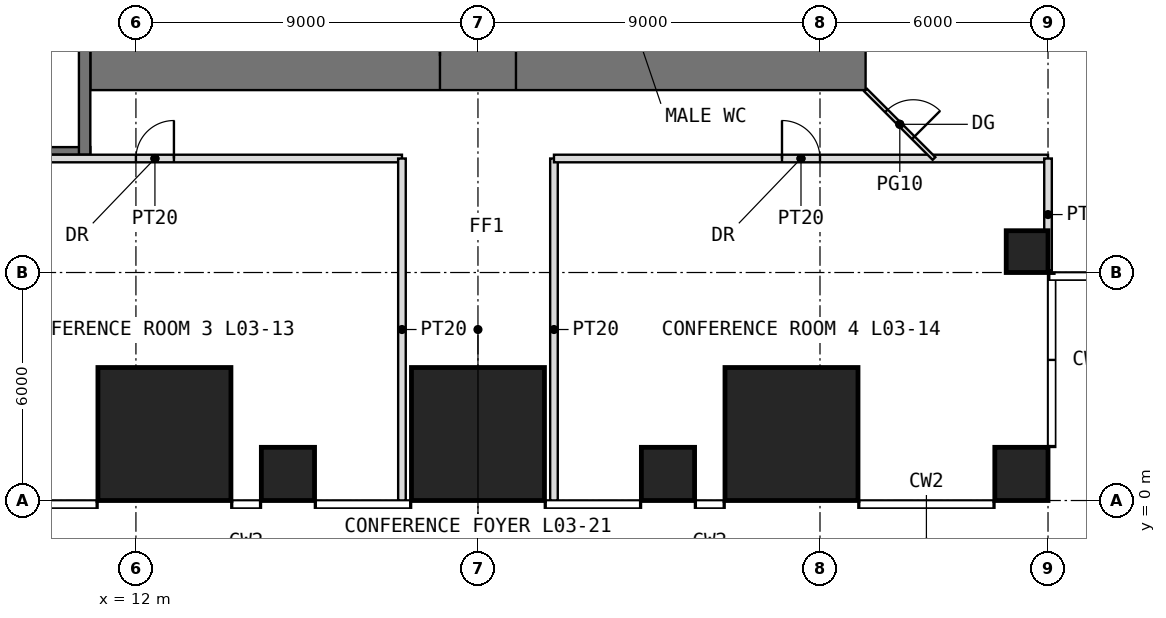
"""IFC4 building model, lengths in metres.
Left out: names, types, materials, properties, quantities, classifications, styles, units other than length and angle.
Written with IfcOpenShell. Run it as: python <this file> out.ifc"""

import sys

from ifc_helpers import new_model, si_unit, direction, frame, frame_2d, origin, origin_2d, place, context, subcontext, project, spatial, rectangle, extrude, element, fill, save


model = new_model("IFC4")
c1 = context("Model", 3, precision=1e-05, world=origin(), true_north=direction((0.0, 1.0)))
c2 = subcontext(c1, "Body", "Model", "MODEL_VIEW")
j1 = project(units=[si_unit("LENGTHUNIT", "METRE"), si_unit("PLANEANGLEUNIT", "RADIAN")], contexts=[c1])
p1 = place(None, origin())
s1 = spatial("IfcSite", under=j1, at=p1, CompositionType="ELEMENT")
p2 = place(p1, origin())
s2 = spatial("IfcBuilding", under=s1, at=p2, CompositionType="ELEMENT")
p3 = place(p2, frame((0.0, 0.0, 18.0)))
s3 = spatial("IfcBuildingStorey", under=s2, at=p3, CompositionType="ELEMENT", Elevation=18.0)
p4 = place(p3, frame((12.75, 1.75, 0.0), z_axis=(0.0, 0.0, 1.0), x_axis=(1.0, 0.0, 0.0)))
e1 = element("IfcColumn", 1, at=p4, inside=s3, PredefinedType="COLUMN", context=c2, shape_type="SweptSolid", body=[
    extrude(rectangle(XDim=3.5, YDim=3.5, at=origin_2d()), origin(), (0.0, 0.0, 1.0), 4.5),
])
p5 = place(p3, frame((16.0, 0.7, 0.0), z_axis=(0.0, 0.0, 1.0), x_axis=(1.0, 0.0, 0.0)))
e2 = element("IfcColumn", 2, at=p5, inside=s3, PredefinedType="COLUMN", context=c2, shape_type="SweptSolid", body=[
    extrude(rectangle(XDim=1.4, YDim=1.4, at=origin_2d()), origin(), (0.0, 0.0, 1.0), 4.5),
])
p6 = place(p3, frame((21.0, 1.75, 0.0), z_axis=(0.0, 0.0, 1.0), x_axis=(1.0, 0.0, 0.0)))
e3 = element("IfcColumn", 3, at=p6, inside=s3, PredefinedType="COLUMN", context=c2, shape_type="SweptSolid", body=[
    extrude(rectangle(XDim=3.5, YDim=3.5, at=origin_2d()), origin(), (0.0, 0.0, 1.0), 4.5),
])
p7 = place(p3, frame((26.0, 0.7, 0.0), z_axis=(0.0, 0.0, 1.0), x_axis=(1.0, 0.0, 0.0)))
e4 = element("IfcColumn", 4, at=p7, inside=s3, PredefinedType="COLUMN", context=c2, shape_type="SweptSolid", body=[
    extrude(rectangle(XDim=1.4, YDim=1.4, at=origin_2d()), origin(), (0.0, 0.0, 1.0), 4.5),
])
p8 = place(p3, frame((29.25, 1.75, 0.0), z_axis=(0.0, 0.0, 1.0), x_axis=(1.0, 0.0, 0.0)))
e5 = element("IfcColumn", 5, at=p8, inside=s3, PredefinedType="COLUMN", context=c2, shape_type="SweptSolid", body=[
    extrude(rectangle(XDim=3.5, YDim=3.5, at=origin_2d()), origin(), (0.0, 0.0, 1.0), 4.5),
])
p9 = place(p3, frame((35.3, 0.7, 0.0), z_axis=(0.0, 0.0, 1.0), x_axis=(1.0, 0.0, 0.0)))
e6 = element("IfcColumn", 6, at=p9, inside=s3, PredefinedType="COLUMN", context=c2, shape_type="SweptSolid", body=[
    extrude(rectangle(XDim=1.4, YDim=1.4, at=origin_2d()), origin(), (0.0, 0.0, 1.0), 4.5),
])
p10 = place(p3, frame((35.45, 6.55, 0.0), z_axis=(0.0, 0.0, 1.0), x_axis=(1.0, 0.0, 0.0)))
e7 = element("IfcColumn", 7, at=p10, inside=s3, PredefinedType="COLUMN", context=c2, shape_type="SweptSolid", body=[
    extrude(rectangle(XDim=1.1, YDim=1.1, at=origin_2d()), origin(), (0.0, 0.0, 1.0), 4.5),
])
p11 = place(p3, frame((10.8, 11.7, -0.2), z_axis=(0.0, 0.0, 1.0), x_axis=(1.0, 0.0, 0.0)))
e8 = element("IfcWall", 8, at=p11, inside=s3, PredefinedType="SHEAR", context=c2, shape_type="SweptSolid", body=[
    extrude(rectangle(XDim=20.4, YDim=1.8, at=frame_2d((10.2, 0.0))), origin(), (0.0, 0.0, 1.0), 4.65),
])
p12 = place(p11, frame((9.2, 0.0, 0.2)))
e9 = element("IfcOpeningElement", 9, at=p12, cuts=e8, PredefinedType="OPENING", context=c2, shape_type="SweptSolid", body=[
    extrude(rectangle(XDim=2.0, YDim=2.2, at=frame_2d((1.0, 1.1))), frame((0.0, 0.91, 0.0), z_axis=(0.0, -1.0, 0.0), x_axis=(1.0, 0.0, 0.0)), (0.0, 0.0, 1.0), 1.82),
])
p13 = place(p3, frame((3.8, 9.2, -0.2), z_axis=(0.0, 0.0, 1.0), x_axis=(1.0, 0.0, 0.0)))
e10 = element("IfcWall", 10, at=p13, inside=s3, PredefinedType="SOLIDWALL", context=c2, shape_type="SweptSolid", body=[
    extrude(rectangle(XDim=7.0, YDim=0.2, at=frame_2d((3.5, 0.0))), origin(), (0.0, 0.0, 1.0), 4.65),
])
p14 = place(p3, frame((10.65, 9.1, -0.2), z_axis=(0.0, 0.0, 1.0), x_axis=(0.0, 1.0, 0.0)))
e11 = element("IfcWall", 11, at=p14, inside=s3, PredefinedType="SOLIDWALL", context=c2, shape_type="SweptSolid", body=[
    extrude(rectangle(XDim=12.4, YDim=0.3, at=frame_2d((6.2, 0.0))), origin(), (0.0, 0.0, 1.0), 4.65),
])
p15 = place(p3, frame((6.0, 9.0, 0.0), z_axis=(0.0, 0.0, 1.0), x_axis=(1.0, 0.0, 0.0)))
e12 = element("IfcWall", 12, at=p15, inside=s3, PredefinedType="PARTITIONING", context=c2, shape_type="SweptSolid", body=[
    extrude(rectangle(XDim=13.0, YDim=0.2, at=frame_2d((6.5, 0.0))), origin(), (0.0, 0.0, 1.0), 4.25),
])
p16 = place(p15, frame((6.0, 0.0, 0.0)))
e13 = element("IfcOpeningElement", 13, at=p16, cuts=e12, PredefinedType="OPENING", context=c2, shape_type="SweptSolid", body=[
    extrude(rectangle(XDim=1.0, YDim=2.2, at=frame_2d((0.5, 1.1))), frame((0.0, 0.11, 0.0), z_axis=(0.0, -1.0, 0.0), x_axis=(1.0, 0.0, 0.0)), (0.0, 0.0, 1.0), 0.22),
])
for number, where, z_axis, x_axis in (
    (14, (19.0, 0.0, 0.0), (0.0, 0.0, 1.0), (0.0, 1.0, 0.0)),
    (15, (23.0, 0.0, 0.0), (0.0, 0.0, 1.0), (0.0, 1.0, 0.0)),
):
    element("IfcWall", number, at=place(p3, frame(where, z_axis=z_axis, x_axis=x_axis)), inside=s3, PredefinedType="PARTITIONING", context=c2, shape_type="SweptSolid", body=[
        extrude(rectangle(XDim=9.0, YDim=0.2, at=frame_2d((4.5, 0.0))), origin(), (0.0, 0.0, 1.0), 4.25),
    ])
p17 = place(p3, frame((23.0, 9.0, 0.0), z_axis=(0.0, 0.0, 1.0), x_axis=(1.0, 0.0, 0.0)))
e16 = element("IfcWall", 16, at=p17, inside=s3, PredefinedType="PARTITIONING", context=c2, shape_type="SweptSolid", body=[
    extrude(rectangle(XDim=13.0, YDim=0.2, at=frame_2d((6.5, 0.0))), origin(), (0.0, 0.0, 1.0), 4.25),
])
p18 = place(p17, frame((6.0, 0.0, 0.0)))
e17 = element("IfcOpeningElement", 17, at=p18, cuts=e16, PredefinedType="OPENING", context=c2, shape_type="SweptSolid", body=[
    extrude(rectangle(XDim=1.0, YDim=2.2, at=frame_2d((0.5, 1.1))), frame((0.0, 0.11, 0.0), z_axis=(0.0, -1.0, 0.0), x_axis=(1.0, 0.0, 0.0)), (0.0, 0.0, 1.0), 0.22),
])
p19 = place(p3, frame((36.0, 6.05, 0.0), z_axis=(0.0, 0.0, 1.0), x_axis=(0.0, 1.0, 0.0)))
e18 = element("IfcWall", 18, at=p19, inside=s3, PredefinedType="PARTITIONING", context=c2, shape_type="SweptSolid", body=[
    extrude(rectangle(XDim=2.95, YDim=0.2, at=frame_2d((1.475, 0.0))), origin(), (0.0, 0.0, 1.0), 3.63),
])
p20 = place(p3, frame((31.2, 10.8, 0.0), z_axis=(0.0, 0.0, 1.0), x_axis=(0.707106781187, -0.707106781187, 0.0)))
e19 = element("IfcWall", 19, at=p20, inside=s3, PredefinedType="PARTITIONING", context=c2, shape_type="SweptSolid", body=[
    extrude(rectangle(XDim=2.546, YDim=0.1, at=frame_2d((1.273, 0.0))), origin(), (0.0, 0.0, 1.0), 4.25),
])
p21 = place(p20, frame((0.773, 0.0, 0.0)))
e20 = element("IfcOpeningElement", 20, at=p21, cuts=e19, PredefinedType="OPENING", context=c2, shape_type="SweptSolid", body=[
    extrude(rectangle(XDim=1.0, YDim=2.4, at=frame_2d((0.5, 1.2))), frame((0.0, 0.06, 0.0), z_axis=(0.0, -1.0, 0.0), x_axis=(1.0, 0.0, 0.0)), (0.0, 0.0, 1.0), 0.12),
])
p22 = place(p12, origin())
e21 = element("IfcDoor", 21, at=p22, inside=s3, OperationType="DOUBLE_DOOR_SINGLE_SWING", PredefinedType="DOOR", context=c2, shape_type="SweptSolid", body=[
    extrude(rectangle(XDim=2.0, YDim=2.2, at=frame_2d((1.0, 1.1))), frame((0.0, 0.025, 0.0), z_axis=(0.0, -1.0, 0.0), x_axis=(1.0, 0.0, 0.0)), (0.0, 0.0, 1.0), 0.05),
])
fill(e9, e21)
p23 = place(p16, origin())
e22 = element("IfcDoor", 22, at=p23, inside=s3, OperationType="SINGLE_SWING_RIGHT", PredefinedType="DOOR", context=c2, shape_type="SweptSolid", body=[
    extrude(rectangle(XDim=1.0, YDim=2.2, at=frame_2d((0.5, 1.1))), frame((0.0, 0.025, 0.0), z_axis=(0.0, -1.0, 0.0), x_axis=(1.0, 0.0, 0.0)), (0.0, 0.0, 1.0), 0.05),
])
fill(e13, e22)
p24 = place(p18, origin())
e23 = element("IfcDoor", 23, at=p24, inside=s3, OperationType="SINGLE_SWING_LEFT", PredefinedType="DOOR", context=c2, shape_type="SweptSolid", body=[
    extrude(rectangle(XDim=1.0, YDim=2.2, at=frame_2d((0.5, 1.1))), frame((0.0, 0.025, 0.0), z_axis=(0.0, -1.0, 0.0), x_axis=(1.0, 0.0, 0.0)), (0.0, 0.0, 1.0), 0.05),
])
fill(e17, e23)
p25 = place(p21, origin())
e24 = element("IfcDoor", 24, at=p25, inside=s3, OperationType="SINGLE_SWING_RIGHT", PredefinedType="DOOR", context=c2, shape_type="SweptSolid", body=[
    extrude(rectangle(XDim=1.0, YDim=2.4, at=frame_2d((0.5, 1.2))), frame((0.0, 0.025, 0.0), z_axis=(0.0, -1.0, 0.0), x_axis=(1.0, 0.0, 0.0)), (0.0, 0.0, 1.0), 0.05),
])
fill(e20, e24)
save(model, sys.argv[1])
